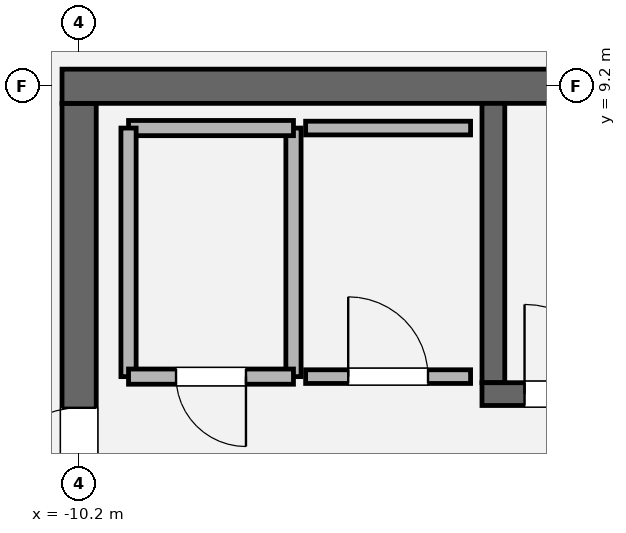
"""IFC4 building model, lengths in metres.
Left out: names, types, materials, properties, quantities, classifications, styles, units other than length and angle.
Written with IfcOpenShell. Run it as: python <this file> out.ifc"""

import sys

from ifc_helpers import new_model, si_unit, direction, frame, frame_2d, origin, place, context, subcontext, project, spatial, rectangle, extrude, element, fill, save


model = new_model("IFC4")
c1 = context("Model", 3, precision=1e-05, world=origin(), true_north=direction((0.0, 1.0)))
c2 = subcontext(c1, "Body", "Model", "MODEL_VIEW")
j1 = project(units=[si_unit("LENGTHUNIT", "METRE"), si_unit("PLANEANGLEUNIT", "RADIAN")], contexts=[c1])
p1 = place(None, origin())
s1 = spatial("IfcSite", under=j1, at=p1, CompositionType="ELEMENT")
p2 = place(p1, origin())
s2 = spatial("IfcBuilding", under=s1, at=p2, CompositionType="ELEMENT")
p3 = place(p2, frame((0.0, 0.0, 330.0)))
s3 = spatial("IfcBuildingStorey", under=s2, at=p3, CompositionType="ELEMENT", Elevation=330.0)
p4 = place(p3, frame((-10.2, -8.975, 0.0), z_axis=(0.0, 0.0, 1.0), x_axis=(0.0, 1.0, 0.0)))
e1 = element("IfcWall", 1, at=p4, inside=s3, PredefinedType="SHEAR", context=c2, shape_type="SweptSolid", body=[
    extrude(rectangle(XDim=17.95, YDim=0.45, at=frame_2d((8.975, 0.0))), origin(), (0.0, 0.0, 1.0), 4.2),
])
p5 = place(p4, frame((12.765, 0.0, 0.0)))
e2 = element("IfcOpeningElement", 2, at=p5, cuts=e1, PredefinedType="OPENING", context=c2, shape_type="SweptSolid", body=[
    extrude(rectangle(XDim=1.18, YDim=2.2, at=frame_2d((0.59, 1.1))), frame((0.0, 0.235, 0.0), z_axis=(0.0, -1.0, 0.0), x_axis=(1.0, 0.0, 0.0)), (0.0, 0.0, 1.0), 0.47),
])
p6 = place(p3, frame((-10.425, 9.2, 0.0), z_axis=(0.0, 0.0, 1.0), x_axis=(1.0, 0.0, 0.0)))
e3 = element("IfcWall", 3, at=p6, inside=s3, PredefinedType="SHEAR", context=c2, shape_type="SweptSolid", body=[
    extrude(rectangle(XDim=20.85, YDim=0.45, at=frame_2d((10.425, 0.0))), origin(), (0.0, 0.0, 1.0), 4.2),
])
p7 = place(p3, frame((-4.75, 5.3, 0.0), z_axis=(0.0, 0.0, 1.0), x_axis=(0.0, 1.0, 0.0)))
e4 = element("IfcWall", 4, at=p7, inside=s3, PredefinedType="SOLIDWALL", context=c2, shape_type="SweptSolid", body=[
    extrude(rectangle(XDim=3.675, YDim=0.3, at=frame_2d((1.837, 0.0))), origin(), (0.0, 0.0, 1.0), 4.2),
])
p8 = place(p3, frame((-4.9, 5.15, 0.0), z_axis=(0.0, 0.0, 1.0), x_axis=(1.0, 0.0, 0.0)))
e5 = element("IfcWall", 5, at=p8, inside=s3, PredefinedType="SOLIDWALL", context=c2, shape_type="SweptSolid", body=[
    extrude(rectangle(XDim=9.8, YDim=0.3, at=frame_2d((4.9, 0.0))), origin(), (0.0, 0.0, 1.0), 4.2),
])
p9 = place(p8, frame((0.56, 0.0, 0.0)))
e6 = element("IfcOpeningElement", 6, at=p9, cuts=e5, PredefinedType="OPENING", context=c2, shape_type="SweptSolid", body=[
    extrude(rectangle(XDim=1.18, YDim=2.2, at=frame_2d((0.59, 1.1))), frame((0.0, 0.16, 0.0), z_axis=(0.0, -1.0, 0.0), x_axis=(1.0, 0.0, 0.0)), (0.0, 0.0, 1.0), 0.32),
])
p10 = place(p3, frame((-7.38, 5.38, 0.0), z_axis=(0.0, 0.0, 1.0), x_axis=(0.0, 1.0, 0.0)))
e7 = element("IfcWall", 7, at=p10, inside=s3, PredefinedType="SOLIDWALL", context=c2, shape_type="SweptSolid", body=[
    extrude(rectangle(XDim=3.27, YDim=0.2, at=frame_2d((1.635, 0.0))), origin(), (0.0, 0.0, 1.0), 3.94),
])
p11 = place(p3, frame((-7.38, 8.65, 0.0), z_axis=(0.0, 0.0, 1.0), x_axis=(-1.0, 0.0, 0.0)))
e8 = element("IfcWall", 8, at=p11, inside=s3, PredefinedType="SOLIDWALL", context=c2, shape_type="SweptSolid", body=[
    extrude(rectangle(XDim=2.17, YDim=0.2, at=frame_2d((1.085, 0.0))), origin(), (0.0, 0.0, 1.0), 3.94),
])
p12 = place(p3, frame((-9.55, 8.65, 0.0), z_axis=(0.0, 0.0, 1.0), x_axis=(0.0, -1.0, 0.0)))
e9 = element("IfcWall", 9, at=p12, inside=s3, PredefinedType="SOLIDWALL", context=c2, shape_type="SweptSolid", body=[
    extrude(rectangle(XDim=3.27, YDim=0.2, at=frame_2d((1.635, 0.0))), origin(), (0.0, 0.0, 1.0), 3.94),
])
p13 = place(p3, frame((-9.55, 5.38, 0.0), z_axis=(0.0, 0.0, 1.0), x_axis=(1.0, 0.0, 0.0)))
e10 = element("IfcWall", 10, at=p13, inside=s3, PredefinedType="SOLIDWALL", context=c2, shape_type="SweptSolid", body=[
    extrude(rectangle(XDim=2.17, YDim=0.2, at=frame_2d((1.085, 0.0))), origin(), (0.0, 0.0, 1.0), 3.94),
])
p14 = place(p13, frame((0.625, 0.0, 0.0)))
e11 = element("IfcOpeningElement", 11, at=p14, cuts=e10, PredefinedType="OPENING", context=c2, shape_type="SweptSolid", body=[
    extrude(rectangle(XDim=0.92, YDim=2.1, at=frame_2d((0.46, 1.05))), frame((0.0, 0.11, 0.0), z_axis=(0.0, -1.0, 0.0), x_axis=(1.0, 0.0, 0.0)), (0.0, 0.0, 1.0), 0.22),
])
p15 = place(p3, frame((-5.05, 8.65, 0.0), z_axis=(0.0, 0.0, 1.0), x_axis=(-1.0, 0.0, 0.0)))
e12 = element("IfcWall", 12, at=p15, inside=s3, PredefinedType="PARTITIONING", context=c2, shape_type="SweptSolid", body=[
    extrude(rectangle(XDim=2.17, YDim=0.18, at=frame_2d((1.085, 0.0))), origin(), (0.0, 0.0, 1.0), 3.94),
])
p16 = place(p3, frame((-7.22, 5.38, 0.0), z_axis=(0.0, 0.0, 1.0), x_axis=(1.0, 0.0, 0.0)))
e13 = element("IfcWall", 13, at=p16, inside=s3, PredefinedType="PARTITIONING", context=c2, shape_type="SweptSolid", body=[
    extrude(rectangle(XDim=2.17, YDim=0.18, at=frame_2d((1.085, 0.0))), origin(), (0.0, 0.0, 1.0), 3.94),
])
p17 = place(p16, frame((0.56, 0.0, 0.0)))
e14 = element("IfcOpeningElement", 14, at=p17, cuts=e13, PredefinedType="OPENING", context=c2, shape_type="SweptSolid", body=[
    extrude(rectangle(XDim=1.05, YDim=2.2, at=frame_2d((0.525, 1.1))), frame((0.0, 0.1, 0.0), z_axis=(0.0, -1.0, 0.0), x_axis=(1.0, 0.0, 0.0)), (0.0, 0.0, 1.0), 0.2),
])
p18 = place(p9, origin())
e15 = element("IfcDoor", 15, at=p18, inside=s3, OperationType="SINGLE_SWING_LEFT", PredefinedType="DOOR", context=c2, shape_type="SweptSolid", body=[
    extrude(rectangle(XDim=1.18, YDim=2.2, at=frame_2d((0.59, 1.1))), frame((0.0, 0.025, 0.0), z_axis=(0.0, -1.0, 0.0), x_axis=(1.0, 0.0, 0.0)), (0.0, 0.0, 1.0), 0.05),
])
fill(e6, e15)
p19 = place(p5, origin())
e16 = element("IfcDoor", 16, at=p19, inside=s3, OperationType="SINGLE_SWING_LEFT", PredefinedType="DOOR", context=c2, shape_type="SweptSolid", body=[
    extrude(rectangle(XDim=1.18, YDim=2.2, at=frame_2d((0.59, 1.1))), frame((0.0, 0.025, 0.0), z_axis=(0.0, -1.0, 0.0), x_axis=(1.0, 0.0, 0.0)), (0.0, 0.0, 1.0), 0.05),
])
fill(e2, e16)
p20 = place(p14, origin())
e17 = element("IfcDoor", 17, at=p20, inside=s3, OperationType="SINGLE_SWING_RIGHT", PredefinedType="DOOR", context=c2, shape_type="SweptSolid", body=[
    extrude(rectangle(XDim=0.92, YDim=2.1, at=frame_2d((0.46, 1.05))), frame((0.0, 0.025, 0.0), z_axis=(0.0, -1.0, 0.0), x_axis=(1.0, 0.0, 0.0)), (0.0, 0.0, 1.0), 0.05),
])
fill(e11, e17)
p21 = place(p17, origin())
e18 = element("IfcDoor", 18, at=p21, inside=s3, OperationType="SINGLE_SWING_LEFT", PredefinedType="DOOR", context=c2, shape_type="SweptSolid", body=[
    extrude(rectangle(XDim=1.05, YDim=2.2, at=frame_2d((0.525, 1.1))), frame((0.0, 0.025, 0.0), z_axis=(0.0, -1.0, 0.0), x_axis=(1.0, 0.0, 0.0)), (0.0, 0.0, 1.0), 0.05),
])
fill(e14, e18)
save(model, sys.argv[1])
